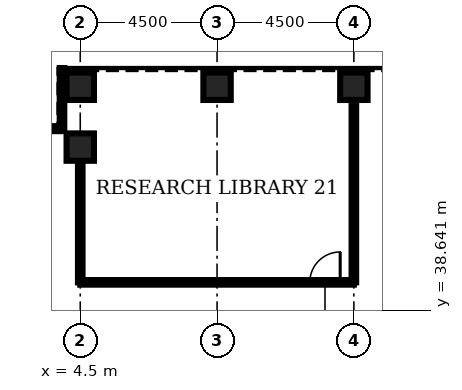
"""IFC4 building model, lengths in metres.
Left out: names, types, materials, properties, quantities, classifications, styles, units other than length and angle.
Written with IfcOpenShell. Run it as: python <this file> out.ifc"""

import sys

from ifc_helpers import new_model, si_unit, direction, frame, frame_2d, origin, origin_2d, place, context, subcontext, project, spatial, rectangle, hollow_rectangle, extrude, element, fill, save


model = new_model("IFC4")
c1 = context("Model", 3, precision=1e-05, world=origin(), true_north=direction((0.0, 1.0)))
c2 = subcontext(c1, "Body", "Model", "MODEL_VIEW")
j1 = project(units=[si_unit("LENGTHUNIT", "METRE"), si_unit("PLANEANGLEUNIT", "RADIAN")], contexts=[c1])
p1 = place(None, origin())
s1 = spatial("IfcSite", under=j1, at=p1, CompositionType="ELEMENT")
p2 = place(p1, origin())
s2 = spatial("IfcBuilding", under=s1, at=p2, CompositionType="ELEMENT")
p3 = place(p2, frame((0.0, 0.0, 90.5)))
s3 = spatial("IfcBuildingStorey", under=s2, at=p3, CompositionType="ELEMENT", Elevation=90.5)
for number, where, z_axis, x_axis in (
    (1, (13.5, 46.0, 0.0), (0.0, 0.0, 1.0), (0.0, 1.0, 0.0)),
    (2, (9.0, 46.0, 0.0), (0.0, 0.0, 1.0), (0.0, 1.0, 0.0)),
    (3, (4.5, 46.0, 0.0), (0.0, 0.0, 1.0), (0.0, 1.0, 0.0)),
    (4, (4.5, 44.0, 0.0), (0.0, 0.0, 1.0), (0.0, 1.0, 0.0)),
):
    element("IfcColumn", number, at=place(p3, frame(where, z_axis=z_axis, x_axis=x_axis)), inside=s3, PredefinedType="COLUMN", context=c2, shape_type="SweptSolid", body=[
        extrude(hollow_rectangle(XDim=0.9, YDim=0.9, WallThickness=0.11, at=origin_2d()), origin(), (0.0, 0.0, 1.0), 4.5),
    ])
p4 = place(p3, frame((4.5, 39.55, 0.0), z_axis=(0.0, 0.0, 1.0), x_axis=(1.0, 0.0, 0.0)))
e5 = element("IfcWall", 5, at=p4, inside=s3, PredefinedType="PARTITIONING", context=c2, shape_type="SweptSolid", body=[
    extrude(rectangle(XDim=9.0, YDim=0.15, at=frame_2d((4.5, 0.0))), origin(), (0.0, 0.0, 1.0), 3.0),
])
p5 = place(p4, frame((7.55, 0.0, 0.0)))
e6 = element("IfcOpeningElement", 6, at=p5, cuts=e5, PredefinedType="OPENING", context=c2, shape_type="SweptSolid", body=[
    extrude(rectangle(XDim=1.0, YDim=2.1, at=frame_2d((0.5, 1.05))), frame((0.0, 0.085, 0.0), z_axis=(0.0, -1.0, 0.0), x_axis=(1.0, 0.0, 0.0)), (0.0, 0.0, 1.0), 0.17),
])
p6 = place(p3, frame((4.5, 39.55, 0.0), z_axis=(0.0, 0.0, 1.0), x_axis=(0.0, 1.0, 0.0)))
e7 = element("IfcWall", 7, at=p6, inside=s3, PredefinedType="PARTITIONING", context=c2, shape_type="SweptSolid", body=[
    extrude(rectangle(XDim=4.0, YDim=0.15, at=frame_2d((2.0, 0.0))), origin(), (0.0, 0.0, 1.0), 3.0),
])
p7 = place(p3, frame((13.5, 39.55, 0.0), z_axis=(0.0, 0.0, 1.0), x_axis=(0.0, 1.0, 0.0)))
e8 = element("IfcWall", 8, at=p7, inside=s3, PredefinedType="PARTITIONING", context=c2, shape_type="SweptSolid", body=[
    extrude(rectangle(XDim=6.0, YDim=0.15, at=frame_2d((3.0, 0.0))), origin(), (0.0, 0.0, 1.0), 3.0),
])
p8 = place(p3, frame((3.9, 46.6, 0.0), z_axis=(0.0, 0.0, 1.0), x_axis=(0.0, -1.0, 0.0)))
e9 = element("IfcWall", 9, at=p8, inside=s3, PredefinedType="ELEMENTEDWALL", context=c2, shape_type="SweptSolid", body=[
    extrude(rectangle(XDim=2.0, YDim=0.15, at=frame_2d((1.0, 0.0))), origin(), (0.0, 0.0, 1.0), 4.25),
])
p9 = place(p3, frame((3.9, 44.6, 0.0), z_axis=(0.0, 0.0, 1.0), x_axis=(-1.0, 0.0, 0.0)))
e10 = element("IfcWall", 10, at=p9, inside=s3, PredefinedType="ELEMENTEDWALL", context=c2, shape_type="SweptSolid", body=[
    extrude(rectangle(XDim=2.25, YDim=0.15, at=frame_2d((1.125, 0.0))), origin(), (0.0, 0.0, 1.0), 4.25),
])
p10 = place(p5, origin())
e11 = element("IfcDoor", 11, at=p10, inside=s3, OperationType="SINGLE_SWING_RIGHT", PredefinedType="DOOR", context=c2, shape_type="SweptSolid", body=[
    extrude(rectangle(XDim=1.0, YDim=2.1, at=frame_2d((0.5, 1.05))), frame((0.0, 0.025, 0.0), z_axis=(0.0, -1.0, 0.0), x_axis=(1.0, 0.0, 0.0)), (0.0, 0.0, 1.0), 0.05),
])
fill(e6, e11)
save(model, sys.argv[1])
